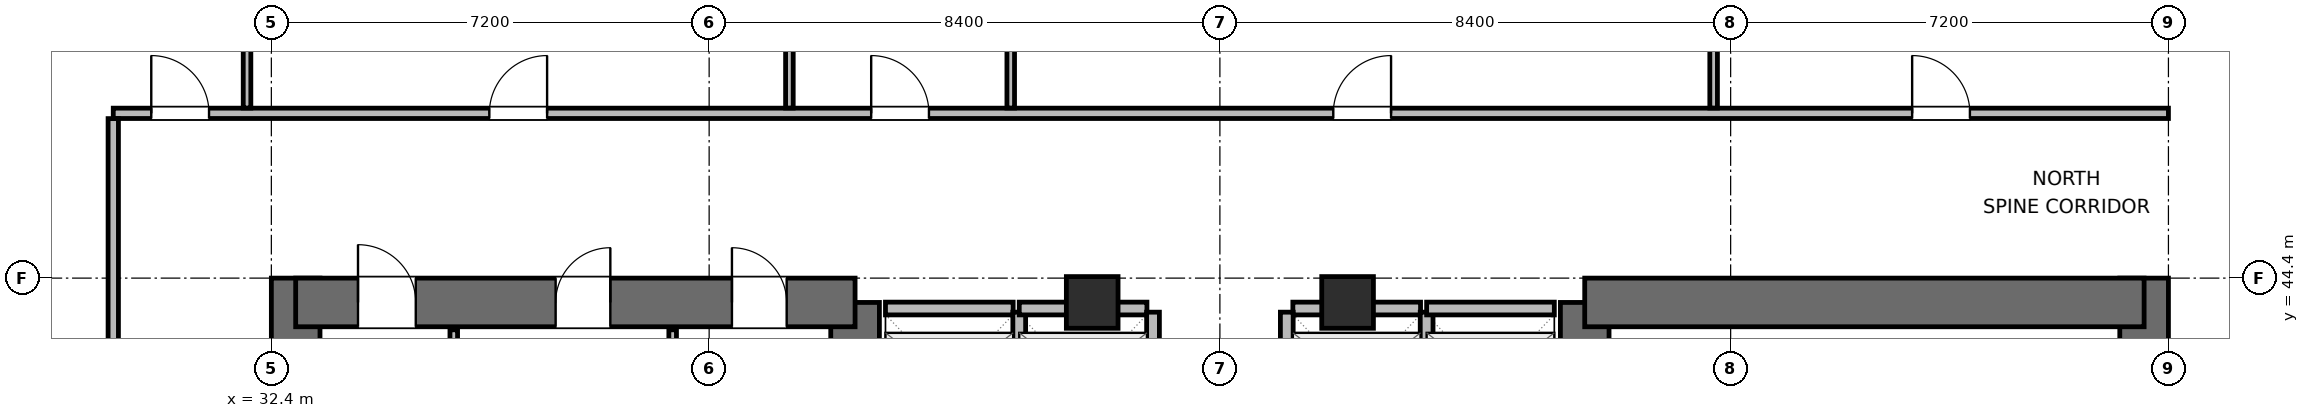
"""IFC4 building model, lengths in metres.
Left out: names, types, materials, properties, quantities, classifications, styles, units other than length and angle.
Written with IfcOpenShell. Run it as: python <this file> out.ifc"""

import sys

from ifc_helpers import new_model, si_unit, direction, frame, frame_2d, origin, origin_2d, place, context, subcontext, project, spatial, rectangle, extrude, element, fill, save


model = new_model("IFC4")
c1 = context("Model", 3, precision=1e-05, world=origin(), true_north=direction((0.0, 1.0)))
c2 = subcontext(c1, "Body", "Model", "MODEL_VIEW")
j1 = project(units=[si_unit("LENGTHUNIT", "METRE"), si_unit("PLANEANGLEUNIT", "RADIAN")], contexts=[c1])
p1 = place(None, origin())
s1 = spatial("IfcSite", under=j1, at=p1, CompositionType="ELEMENT")
p2 = place(p1, origin())
s2 = spatial("IfcBuilding", under=s1, at=p2, CompositionType="ELEMENT")
p3 = place(p2, frame((0.0, 0.0, 162.3)))
s3 = spatial("IfcBuildingStorey", under=s2, at=p3, CompositionType="ELEMENT", Elevation=162.3)
p4 = place(p3, frame((32.8, 27.6, 0.0), z_axis=(0.0, 0.0, 1.0), x_axis=(0.0, 1.0, 0.0)))
e1 = element("IfcWall", 1, at=p4, inside=s3, PredefinedType="SHEAR", context=c2, shape_type="SweptSolid", body=[
    extrude(rectangle(XDim=16.8, YDim=0.8, at=frame_2d((8.4, 0.0))), origin(), (0.0, 0.0, 1.0), 3.9),
])
p5 = place(p3, frame((42.0, 37.8, 0.0), z_axis=(0.0, 0.0, 1.0), x_axis=(0.0, 1.0, 0.0)))
e2 = element("IfcWall", 2, at=p5, inside=s3, PredefinedType="SHEAR", context=c2, shape_type="SweptSolid", body=[
    extrude(rectangle(XDim=6.2, YDim=0.8, at=frame_2d((3.1, 0.0))), origin(), (0.0, 0.0, 1.0), 3.9),
])
p6 = place(p3, frame((32.8, 44.0, 0.0), z_axis=(0.0, 0.0, 1.0), x_axis=(1.0, 0.0, 0.0)))
e3 = element("IfcWall", 3, at=p6, inside=s3, PredefinedType="SHEAR", context=c2, shape_type="SweptSolid", body=[
    extrude(rectangle(XDim=9.2, YDim=0.8, at=frame_2d((4.6, 0.0))), origin(), (0.0, 0.0, 1.0), 3.9),
])
p7 = place(p6, frame((1.025, 0.0, 0.0)))
e4 = element("IfcOpeningElement", 4, at=p7, cuts=e3, PredefinedType="OPENING", context=c2, shape_type="SweptSolid", body=[
    extrude(rectangle(XDim=0.95, YDim=2.04, at=frame_2d((0.475, 1.02))), frame((0.0, 0.41, 0.0), z_axis=(0.0, -1.0, 0.0), x_axis=(1.0, 0.0, 0.0)), (0.0, 0.0, 1.0), 0.82),
])
p8 = place(p6, frame((4.275, 0.0, 0.0)))
e5 = element("IfcOpeningElement", 5, at=p8, cuts=e3, PredefinedType="OPENING", context=c2, shape_type="SweptSolid", body=[
    extrude(rectangle(XDim=0.9, YDim=2.02, at=frame_2d((0.45, 1.01))), frame((0.0, 0.41, 0.0), z_axis=(0.0, -1.0, 0.0), x_axis=(1.0, 0.0, 0.0)), (0.0, 0.0, 1.0), 0.82),
])
p9 = place(p6, frame((7.175, 0.0, 0.0)))
e6 = element("IfcOpeningElement", 6, at=p9, cuts=e3, PredefinedType="OPENING", context=c2, shape_type="SweptSolid", body=[
    extrude(rectangle(XDim=0.9, YDim=2.02, at=frame_2d((0.45, 1.01))), frame((0.0, 0.41, 0.0), z_axis=(0.0, -1.0, 0.0), x_axis=(1.0, 0.0, 0.0)), (0.0, 0.0, 1.0), 0.82),
])
p10 = place(p3, frame((54.0, 38.0, 0.0), z_axis=(0.0, 0.0, 1.0), x_axis=(0.0, 1.0, 0.0)))
e7 = element("IfcWall", 7, at=p10, inside=s3, PredefinedType="SHEAR", context=c2, shape_type="SweptSolid", body=[
    extrude(rectangle(XDim=6.0, YDim=0.8, at=frame_2d((3.0, 0.0))), origin(), (0.0, 0.0, 1.0), 3.9),
])
p11 = place(p3, frame((63.2, 27.6, 0.0), z_axis=(0.0, 0.0, 1.0), x_axis=(0.0, 1.0, 0.0)))
e8 = element("IfcWall", 8, at=p11, inside=s3, PredefinedType="SHEAR", context=c2, shape_type="SweptSolid", body=[
    extrude(rectangle(XDim=16.8, YDim=0.8, at=frame_2d((8.4, 0.0))), origin(), (0.0, 0.0, 1.0), 3.9),
])
p12 = place(p3, frame((54.0, 44.0, 0.0), z_axis=(0.0, 0.0, 1.0), x_axis=(1.0, 0.0, 0.0)))
e9 = element("IfcWall", 9, at=p12, inside=s3, PredefinedType="SHEAR", context=c2, shape_type="SweptSolid", body=[
    extrude(rectangle(XDim=9.2, YDim=0.8, at=frame_2d((4.6, 0.0))), origin(), (0.0, 0.0, 1.0), 3.9),
])
for number, where, z_axis, x_axis in (
    (10, (45.9, 44.0, 0.0), (0.0, 0.0, 1.0), (1.0, 0.0, 0.0)),
    (11, (50.1, 44.0, 0.0), (0.0, 0.0, 1.0), (1.0, 0.0, 0.0)),
):
    element("IfcColumn", number, at=place(p3, frame(where, z_axis=z_axis, x_axis=x_axis)), inside=s3, PredefinedType="COLUMN", context=c2, shape_type="SweptSolid", body=[
        extrude(rectangle(XDim=0.85, YDim=0.85, at=origin_2d()), origin(), (0.0, 0.0, 1.0), 3.9),
    ])
for number, where, z_axis, x_axis in (
    (12, (35.4, 41.095, 0.0), (0.0, 0.0, 1.0), (0.0, 1.0, 0.0)),
    (13, (39.0, 41.095, 0.0), (0.0, 0.0, 1.0), (0.0, 1.0, 0.0)),
):
    element("IfcWall", number, at=place(p3, frame(where, z_axis=z_axis, x_axis=x_axis)), inside=s3, PredefinedType="PARTITIONING", context=c2, shape_type="SweptSolid", body=[
        extrude(rectangle(XDim=2.455, YDim=0.125, at=frame_2d((1.228, 0.0))), origin(), (0.0, 0.0, 1.0), 3.68),
    ])
p13 = place(p3, frame((42.5, 43.9, 0.0), z_axis=(0.0, 0.0, 1.0), x_axis=(1.0, 0.0, 0.0)))
e14 = element("IfcWall", 14, at=p13, inside=s3, PredefinedType="PARTITIONING", context=c2, shape_type="SweptSolid", body=[
    extrude(rectangle(XDim=2.1, YDim=0.21, at=frame_2d((1.05, 0.0))), origin(), (0.0, 0.0, 1.0), 2.765),
])
p14 = place(p3, frame((44.7, 41.56, 0.0), z_axis=(0.0, 0.0, 1.0), x_axis=(0.0, 1.0, 0.0)))
e15 = element("IfcWall", 15, at=p14, inside=s3, PredefinedType="PARTITIONING", context=c2, shape_type="SweptSolid", body=[
    extrude(rectangle(XDim=2.28, YDim=0.21, at=frame_2d((1.14, 0.0))), origin(), (0.0, 0.0, 1.0), 3.68),
])
p15 = place(p3, frame((44.7, 43.9, 0.0), z_axis=(0.0, 0.0, 1.0), x_axis=(1.0, 0.0, 0.0)))
e16 = element("IfcWall", 16, at=p15, inside=s3, PredefinedType="PARTITIONING", context=c2, shape_type="SweptSolid", body=[
    extrude(rectangle(XDim=2.1, YDim=0.21, at=frame_2d((1.05, 0.0))), origin(), (0.0, 0.0, 1.0), 2.765),
])
p16 = place(p3, frame((46.9, 41.56, 0.0), z_axis=(0.0, 0.0, 1.0), x_axis=(0.0, 1.0, 0.0)))
e17 = element("IfcWall", 17, at=p16, inside=s3, PredefinedType="PARTITIONING", context=c2, shape_type="SweptSolid", body=[
    extrude(rectangle(XDim=2.28, YDim=0.21, at=frame_2d((1.14, 0.0))), origin(), (0.0, 0.0, 1.0), 3.68),
])
p17 = place(p3, frame((49.2, 43.9, 0.0), z_axis=(0.0, 0.0, 1.0), x_axis=(1.0, 0.0, 0.0)))
e18 = element("IfcWall", 18, at=p17, inside=s3, PredefinedType="PARTITIONING", context=c2, shape_type="SweptSolid", body=[
    extrude(rectangle(XDim=2.1, YDim=0.21, at=frame_2d((1.05, 0.0))), origin(), (0.0, 0.0, 1.0), 2.765),
])
for number, where, z_axis, x_axis in (
    (19, (49.1, 41.56, 0.0), (0.0, 0.0, 1.0), (0.0, 1.0, 0.0)),
    (20, (51.4, 41.56, 0.0), (0.0, 0.0, 1.0), (0.0, 1.0, 0.0)),
):
    element("IfcWall", number, at=place(p3, frame(where, z_axis=z_axis, x_axis=x_axis)), inside=s3, PredefinedType="PARTITIONING", context=c2, shape_type="SweptSolid", body=[
        extrude(rectangle(XDim=2.28, YDim=0.21, at=frame_2d((1.14, 0.0))), origin(), (0.0, 0.0, 1.0), 3.68),
    ])
p18 = place(p3, frame((51.4, 43.9, 0.0), z_axis=(0.0, 0.0, 1.0), x_axis=(1.0, 0.0, 0.0)))
e21 = element("IfcWall", 21, at=p18, inside=s3, PredefinedType="PARTITIONING", context=c2, shape_type="SweptSolid", body=[
    extrude(rectangle(XDim=2.1, YDim=0.21, at=frame_2d((1.05, 0.0))), origin(), (0.0, 0.0, 1.0), 2.765),
])
p19 = place(p3, frame((29.8, 47.11, 0.0), z_axis=(0.0, 0.0, 1.0), x_axis=(1.0, 0.0, 0.0)))
e22 = element("IfcWall", 22, at=p19, inside=s3, PredefinedType="PARTITIONING", context=c2, shape_type="SweptSolid", body=[
    extrude(rectangle(XDim=33.8, YDim=0.17, at=frame_2d((16.9, 0.0))), origin(), (0.0, 0.0, 1.0), 3.68),
])
p20 = place(p19, frame((0.625, 0.0, 0.0)))
e23 = element("IfcOpeningElement", 23, at=p20, cuts=e22, PredefinedType="OPENING", context=c2, shape_type="SweptSolid", body=[
    extrude(rectangle(XDim=0.95, YDim=2.04, at=frame_2d((0.475, 1.02))), frame((0.0, 0.095, 0.0), z_axis=(0.0, -1.0, 0.0), x_axis=(1.0, 0.0, 0.0)), (0.0, 0.0, 1.0), 0.19),
])
p21 = place(p19, frame((6.185, 0.0, 0.0)))
e24 = element("IfcOpeningElement", 24, at=p21, cuts=e22, PredefinedType="OPENING", context=c2, shape_type="SweptSolid", body=[
    extrude(rectangle(XDim=0.95, YDim=2.04, at=frame_2d((0.475, 1.02))), frame((0.0, 0.095, 0.0), z_axis=(0.0, -1.0, 0.0), x_axis=(1.0, 0.0, 0.0)), (0.0, 0.0, 1.0), 0.19),
])
p22 = place(p19, frame((12.465, 0.0, 0.0)))
e25 = element("IfcOpeningElement", 25, at=p22, cuts=e22, PredefinedType="OPENING", context=c2, shape_type="SweptSolid", body=[
    extrude(rectangle(XDim=0.95, YDim=2.04, at=frame_2d((0.475, 1.02))), frame((0.0, 0.095, 0.0), z_axis=(0.0, -1.0, 0.0), x_axis=(1.0, 0.0, 0.0)), (0.0, 0.0, 1.0), 0.19),
])
p23 = place(p19, frame((20.065, 0.0, 0.0)))
e26 = element("IfcOpeningElement", 26, at=p23, cuts=e22, PredefinedType="OPENING", context=c2, shape_type="SweptSolid", body=[
    extrude(rectangle(XDim=0.95, YDim=2.04, at=frame_2d((0.475, 1.02))), frame((0.0, 0.095, 0.0), z_axis=(0.0, -1.0, 0.0), x_axis=(1.0, 0.0, 0.0)), (0.0, 0.0, 1.0), 0.19),
])
p24 = place(p19, frame((29.585, 0.0, 0.0)))
e27 = element("IfcOpeningElement", 27, at=p24, cuts=e22, PredefinedType="OPENING", context=c2, shape_type="SweptSolid", body=[
    extrude(rectangle(XDim=0.95, YDim=2.04, at=frame_2d((0.475, 1.02))), frame((0.0, 0.095, 0.0), z_axis=(0.0, -1.0, 0.0), x_axis=(1.0, 0.0, 0.0)), (0.0, 0.0, 1.0), 0.19),
])
p25 = place(p3, frame((29.8, 37.1, 0.0), z_axis=(0.0, 0.0, 1.0), x_axis=(0.0, 1.0, 0.0)))
e28 = element("IfcWall", 28, at=p25, inside=s3, PredefinedType="PARTITIONING", context=c2, shape_type="SweptSolid", body=[
    extrude(rectangle(XDim=9.923, YDim=0.17, at=frame_2d((4.961, 0.0))), origin(), (0.0, 0.0, 1.0), 3.68),
])
p26 = place(p25, frame((4.53, 0.0, 0.0)))
e29 = element("IfcOpeningElement", 29, at=p26, cuts=e28, PredefinedType="OPENING", context=c2, shape_type="SweptSolid", body=[
    extrude(rectangle(XDim=0.95, YDim=2.04, at=frame_2d((0.475, 1.02))), frame((0.0, 0.095, 0.0), z_axis=(0.0, -1.0, 0.0), x_axis=(1.0, 0.0, 0.0)), (0.0, 0.0, 1.0), 0.19),
])
p27 = place(p3, frame((32.0, 47.197, 0.0), z_axis=(0.0, 0.0, 1.0), x_axis=(0.0, 1.0, 0.0)))
e30 = element("IfcWall", 30, at=p27, inside=s3, PredefinedType="PARTITIONING", context=c2, shape_type="SweptSolid", body=[
    extrude(rectangle(XDim=14.968, YDim=0.125, at=frame_2d((7.484, 0.0))), origin(), (0.0, 0.0, 1.0), 3.68),
])
p28 = place(p3, frame((40.92, 47.197, 0.0), z_axis=(0.0, 0.0, 1.0), x_axis=(0.0, 1.0, 0.0)))
e31 = element("IfcWall", 31, at=p28, inside=s3, PredefinedType="PARTITIONING", context=c2, shape_type="SweptSolid", body=[
    extrude(rectangle(XDim=14.968, YDim=0.125, at=frame_2d((7.484, 0.0))), origin(), (0.0, 0.0, 1.0), 3.043),
])
p29 = place(p3, frame((44.56, 47.197, 0.0), z_axis=(0.0, 0.0, 1.0), x_axis=(0.0, 1.0, 0.0)))
e32 = element("IfcWall", 32, at=p29, inside=s3, PredefinedType="PARTITIONING", context=c2, shape_type="SweptSolid", body=[
    extrude(rectangle(XDim=13.328, YDim=0.125, at=frame_2d((6.664, 0.0))), origin(), (0.0, 0.0, 1.0), 3.043),
])
p30 = place(p3, frame((56.12, 47.197, 0.0), z_axis=(0.0, 0.0, 1.0), x_axis=(0.0, 1.0, 0.0)))
e33 = element("IfcWall", 33, at=p30, inside=s3, PredefinedType="PARTITIONING", context=c2, shape_type="SweptSolid", body=[
    extrude(rectangle(XDim=14.928, YDim=0.125, at=frame_2d((7.464, 0.0))), origin(), (0.0, 0.0, 1.0), 3.043),
])
p31 = place(p7, origin())
e34 = element("IfcDoor", 34, at=p31, inside=s3, OperationType="SINGLE_SWING_LEFT", PredefinedType="DOOR", context=c2, shape_type="SweptSolid", body=[
    extrude(rectangle(XDim=0.95, YDim=2.04, at=frame_2d((0.475, 1.02))), frame((0.0, 0.025, 0.0), z_axis=(0.0, -1.0, 0.0), x_axis=(1.0, 0.0, 0.0)), (0.0, 0.0, 1.0), 0.05),
])
fill(e4, e34)
p32 = place(p8, origin())
e35 = element("IfcDoor", 35, at=p32, inside=s3, OperationType="SINGLE_SWING_RIGHT", PredefinedType="DOOR", context=c2, shape_type="SweptSolid", body=[
    extrude(rectangle(XDim=0.9, YDim=2.02, at=frame_2d((0.45, 1.01))), frame((0.0, 0.025, 0.0), z_axis=(0.0, -1.0, 0.0), x_axis=(1.0, 0.0, 0.0)), (0.0, 0.0, 1.0), 0.05),
])
fill(e5, e35)
p33 = place(p9, origin())
e36 = element("IfcDoor", 36, at=p33, inside=s3, OperationType="SINGLE_SWING_LEFT", PredefinedType="DOOR", context=c2, shape_type="SweptSolid", body=[
    extrude(rectangle(XDim=0.9, YDim=2.02, at=frame_2d((0.45, 1.01))), frame((0.0, 0.025, 0.0), z_axis=(0.0, -1.0, 0.0), x_axis=(1.0, 0.0, 0.0)), (0.0, 0.0, 1.0), 0.05),
])
fill(e6, e36)
p34 = place(p20, origin())
e37 = element("IfcDoor", 37, at=p34, inside=s3, OperationType="SINGLE_SWING_LEFT", PredefinedType="DOOR", context=c2, shape_type="SweptSolid", body=[
    extrude(rectangle(XDim=0.95, YDim=2.04, at=frame_2d((0.475, 1.02))), frame((0.0, 0.025, 0.0), z_axis=(0.0, -1.0, 0.0), x_axis=(1.0, 0.0, 0.0)), (0.0, 0.0, 1.0), 0.05),
])
fill(e23, e37)
p35 = place(p21, origin())
e38 = element("IfcDoor", 38, at=p35, inside=s3, OperationType="SINGLE_SWING_RIGHT", PredefinedType="DOOR", context=c2, shape_type="SweptSolid", body=[
    extrude(rectangle(XDim=0.95, YDim=2.04, at=frame_2d((0.475, 1.02))), frame((0.0, 0.025, 0.0), z_axis=(0.0, -1.0, 0.0), x_axis=(1.0, 0.0, 0.0)), (0.0, 0.0, 1.0), 0.05),
])
fill(e24, e38)
p36 = place(p22, origin())
e39 = element("IfcDoor", 39, at=p36, inside=s3, OperationType="SINGLE_SWING_LEFT", PredefinedType="DOOR", context=c2, shape_type="SweptSolid", body=[
    extrude(rectangle(XDim=0.95, YDim=2.04, at=frame_2d((0.475, 1.02))), frame((0.0, 0.025, 0.0), z_axis=(0.0, -1.0, 0.0), x_axis=(1.0, 0.0, 0.0)), (0.0, 0.0, 1.0), 0.05),
])
fill(e25, e39)
p37 = place(p23, origin())
e40 = element("IfcDoor", 40, at=p37, inside=s3, OperationType="SINGLE_SWING_RIGHT", PredefinedType="DOOR", context=c2, shape_type="SweptSolid", body=[
    extrude(rectangle(XDim=0.95, YDim=2.04, at=frame_2d((0.475, 1.02))), frame((0.0, 0.025, 0.0), z_axis=(0.0, -1.0, 0.0), x_axis=(1.0, 0.0, 0.0)), (0.0, 0.0, 1.0), 0.05),
])
fill(e26, e40)
p38 = place(p24, origin())
e41 = element("IfcDoor", 41, at=p38, inside=s3, OperationType="SINGLE_SWING_LEFT", PredefinedType="DOOR", context=c2, shape_type="SweptSolid", body=[
    extrude(rectangle(XDim=0.95, YDim=2.04, at=frame_2d((0.475, 1.02))), frame((0.0, 0.025, 0.0), z_axis=(0.0, -1.0, 0.0), x_axis=(1.0, 0.0, 0.0)), (0.0, 0.0, 1.0), 0.05),
])
fill(e27, e41)
save(model, sys.argv[1])
